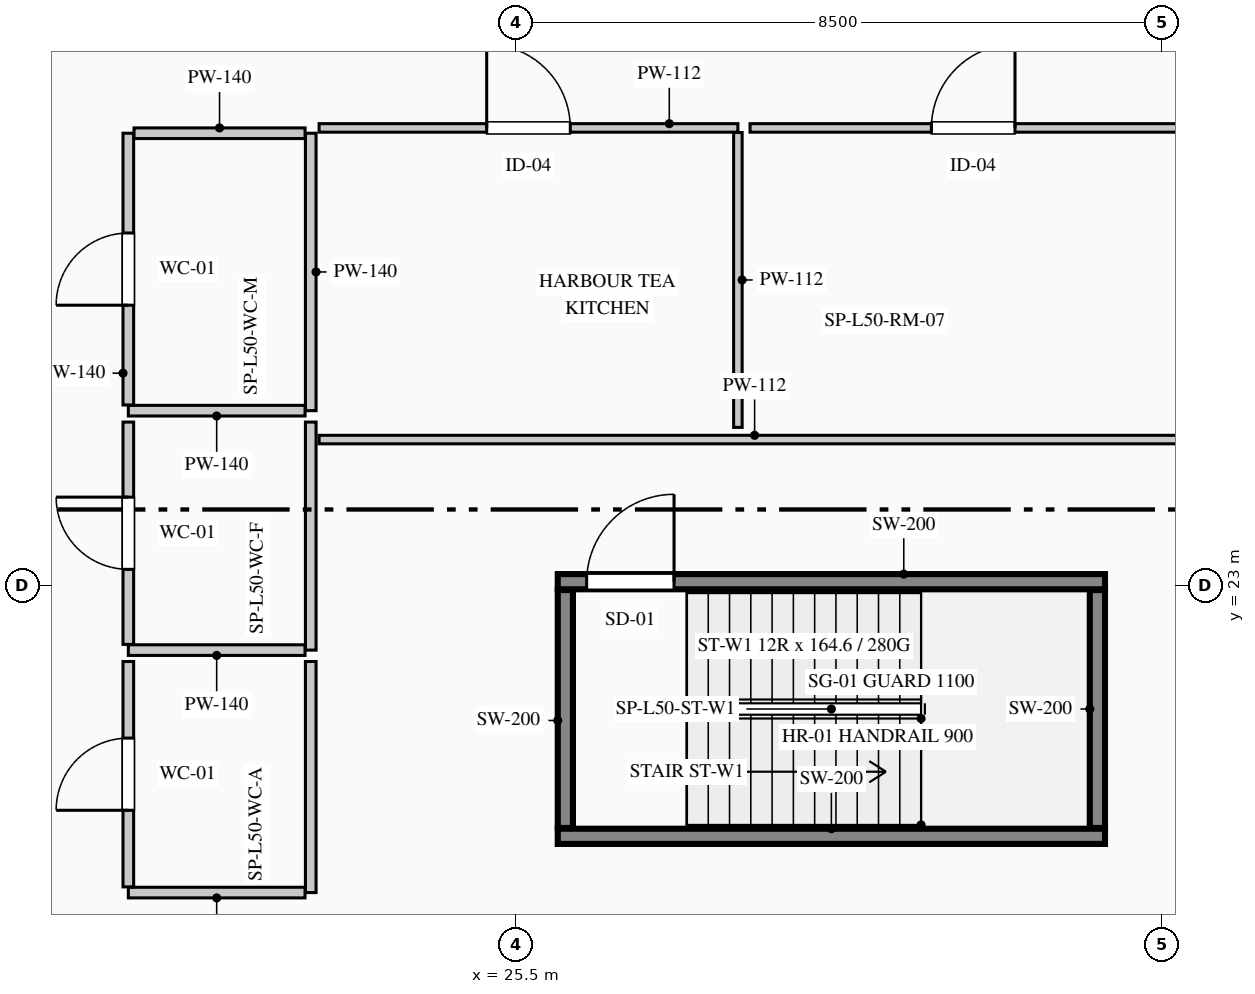
"""IFC4 building model, lengths in metres.
Left out: names, types, materials, properties, quantities, classifications, styles, units other than length and angle.
Written with IfcOpenShell. Run it as: python <this file> out.ifc"""

import sys

from ifc_helpers import new_model, si_unit, direction, frame, frame_2d, origin, place, context, subcontext, project, spatial, rectangle, extrude, element, fill, save


model = new_model("IFC4")
c1 = context("Model", 3, precision=1e-05, world=origin(), true_north=direction((0.0, 1.0)))
c2 = subcontext(c1, "Body", "Model", "MODEL_VIEW")
j1 = project(units=[si_unit("LENGTHUNIT", "METRE"), si_unit("PLANEANGLEUNIT", "RADIAN")], contexts=[c1])
p1 = place(None, origin())
s1 = spatial("IfcSite", under=j1, at=p1, CompositionType="ELEMENT")
p2 = place(p1, origin())
s2 = spatial("IfcBuilding", under=s1, at=p2, CompositionType="ELEMENT")
p3 = place(p2, frame((0.0, 0.0, 211.4)))
s3 = spatial("IfcBuildingStorey", under=s2, at=p3, CompositionType="ELEMENT", Elevation=211.4)
p4 = place(p3, frame((26.05, 19.7, 0.0), z_axis=(0.0, 0.0, 1.0), x_axis=(1.0, 0.0, 0.0)))
e1 = element("IfcWall", 1, at=p4, inside=s3, PredefinedType="SHEAR", context=c2, shape_type="SweptSolid", body=[
    extrude(rectangle(XDim=7.2, YDim=0.2, at=frame_2d((3.6, 0.0))), origin(), (0.0, 0.0, 1.0), 3.95),
])
p5 = place(p3, frame((26.05, 23.05, 0.0), z_axis=(0.0, 0.0, 1.0), x_axis=(1.0, 0.0, 0.0)))
e2 = element("IfcWall", 2, at=p5, inside=s3, PredefinedType="SHEAR", context=c2, shape_type="SweptSolid", body=[
    extrude(rectangle(XDim=7.2, YDim=0.2, at=frame_2d((3.6, 0.0))), origin(), (0.0, 0.0, 1.0), 3.95),
])
p6 = place(p5, frame((0.38, 0.0, 0.0)))
e3 = element("IfcOpeningElement", 3, at=p6, cuts=e2, PredefinedType="OPENING", context=c2, shape_type="SweptSolid", body=[
    extrude(rectangle(XDim=1.15, YDim=2.2, at=frame_2d((0.575, 1.1))), frame((0.0, 0.11, 0.0), z_axis=(0.0, -1.0, 0.0), x_axis=(1.0, 0.0, 0.0)), (0.0, 0.0, 1.0), 0.22),
])
for number, where, z_axis, x_axis in (
    (4, (26.15, 19.81, 0.0), (0.0, 0.0, 1.0), (0.0, 1.0, 0.0)),
    (5, (33.15, 19.81, 0.0), (0.0, 0.0, 1.0), (0.0, 1.0, 0.0)),
):
    element("IfcWall", number, at=place(p3, frame(where, z_axis=z_axis, x_axis=x_axis)), inside=s3, PredefinedType="SHEAR", context=c2, shape_type="SweptSolid", body=[
        extrude(rectangle(XDim=3.13, YDim=0.2, at=frame_2d((1.565, 0.0))), origin(), (0.0, 0.0, 1.0), 3.95),
    ])
p7 = place(p3, frame((22.8, 28.95, 0.0), z_axis=(0.0, 0.0, 1.0), x_axis=(0.0, -1.0, 0.0)))
e6 = element("IfcWall", 6, at=p7, inside=s3, PredefinedType="PARTITIONING", context=c2, shape_type="SweptSolid", body=[
    extrude(rectangle(XDim=3.65, YDim=0.14, at=frame_2d((1.825, 0.0))), origin(), (0.0, 0.0, 1.0), 3.325),
])
p8 = place(p3, frame((22.725, 25.3, 0.0), z_axis=(0.0, 0.0, 1.0), x_axis=(-1.0, 0.0, 0.0)))
e7 = element("IfcWall", 7, at=p8, inside=s3, PredefinedType="PARTITIONING", context=c2, shape_type="SweptSolid", body=[
    extrude(rectangle(XDim=2.325, YDim=0.14, at=frame_2d((1.163, 0.0))), origin(), (0.0, 0.0, 1.0), 3.7),
])
p9 = place(p3, frame((20.4, 25.375, 0.0), z_axis=(0.0, 0.0, 1.0), x_axis=(0.0, 1.0, 0.0)))
e8 = element("IfcWall", 8, at=p9, inside=s3, PredefinedType="PARTITIONING", context=c2, shape_type="SweptSolid", body=[
    extrude(rectangle(XDim=3.575, YDim=0.14, at=frame_2d((1.788, 0.0))), origin(), (0.0, 0.0, 1.0), 3.7),
])
p10 = place(p9, frame((1.312, 0.0, 0.0)))
e9 = element("IfcOpeningElement", 9, at=p10, cuts=e8, PredefinedType="OPENING", context=c2, shape_type="SweptSolid", body=[
    extrude(rectangle(XDim=0.95, YDim=2.15, at=frame_2d((0.475, 1.075))), frame((0.0, 0.08, 0.0), z_axis=(0.0, -1.0, 0.0), x_axis=(1.0, 0.0, 0.0)), (0.0, 0.0, 1.0), 0.16),
])
p11 = place(p3, frame((20.475, 28.95, 0.0), z_axis=(0.0, 0.0, 1.0), x_axis=(1.0, 0.0, 0.0)))
e10 = element("IfcWall", 10, at=p11, inside=s3, PredefinedType="PARTITIONING", context=c2, shape_type="SweptSolid", body=[
    extrude(rectangle(XDim=2.25, YDim=0.14, at=frame_2d((1.125, 0.0))), origin(), (0.0, 0.0, 1.0), 3.7),
])
p12 = place(p3, frame((22.8, 25.15, 0.0), z_axis=(0.0, 0.0, 1.0), x_axis=(0.0, -1.0, 0.0)))
e11 = element("IfcWall", 11, at=p12, inside=s3, PredefinedType="PARTITIONING", context=c2, shape_type="SweptSolid", body=[
    extrude(rectangle(XDim=3.0, YDim=0.14, at=frame_2d((1.5, 0.0))), origin(), (0.0, 0.0, 1.0), 3.325),
])
p13 = place(p3, frame((22.725, 22.15, 0.0), z_axis=(0.0, 0.0, 1.0), x_axis=(-1.0, 0.0, 0.0)))
e12 = element("IfcWall", 12, at=p13, inside=s3, PredefinedType="PARTITIONING", context=c2, shape_type="SweptSolid", body=[
    extrude(rectangle(XDim=2.325, YDim=0.14, at=frame_2d((1.163, 0.0))), origin(), (0.0, 0.0, 1.0), 3.7),
])
p14 = place(p3, frame((20.4, 22.225, 0.0), z_axis=(0.0, 0.0, 1.0), x_axis=(0.0, 1.0, 0.0)))
e13 = element("IfcWall", 13, at=p14, inside=s3, PredefinedType="PARTITIONING", context=c2, shape_type="SweptSolid", body=[
    extrude(rectangle(XDim=2.925, YDim=0.14, at=frame_2d((1.462, 0.0))), origin(), (0.0, 0.0, 1.0), 3.7),
])
p15 = place(p14, frame((0.988, 0.0, 0.0)))
e14 = element("IfcOpeningElement", 14, at=p15, cuts=e13, PredefinedType="OPENING", context=c2, shape_type="SweptSolid", body=[
    extrude(rectangle(XDim=0.95, YDim=2.15, at=frame_2d((0.475, 1.075))), frame((0.0, 0.08, 0.0), z_axis=(0.0, -1.0, 0.0), x_axis=(1.0, 0.0, 0.0)), (0.0, 0.0, 1.0), 0.16),
])
p16 = place(p3, frame((22.8, 22.0, 0.0), z_axis=(0.0, 0.0, 1.0), x_axis=(0.0, -1.0, 0.0)))
e15 = element("IfcWall", 15, at=p16, inside=s3, PredefinedType="PARTITIONING", context=c2, shape_type="SweptSolid", body=[
    extrude(rectangle(XDim=3.04, YDim=0.14, at=frame_2d((1.52, 0.0))), origin(), (0.0, 0.0, 1.0), 3.325),
])
p17 = place(p3, frame((22.725, 18.96, 0.0), z_axis=(0.0, 0.0, 1.0), x_axis=(-1.0, 0.0, 0.0)))
e16 = element("IfcWall", 16, at=p17, inside=s3, PredefinedType="PARTITIONING", context=c2, shape_type="SweptSolid", body=[
    extrude(rectangle(XDim=2.325, YDim=0.14, at=frame_2d((1.163, 0.0))), origin(), (0.0, 0.0, 1.0), 3.7),
])
p18 = place(p3, frame((20.4, 19.035, 0.0), z_axis=(0.0, 0.0, 1.0), x_axis=(0.0, 1.0, 0.0)))
e17 = element("IfcWall", 17, at=p18, inside=s3, PredefinedType="PARTITIONING", context=c2, shape_type="SweptSolid", body=[
    extrude(rectangle(XDim=2.965, YDim=0.14, at=frame_2d((1.482, 0.0))), origin(), (0.0, 0.0, 1.0), 3.7),
])
p19 = place(p18, frame((1.008, 0.0, 0.0)))
e18 = element("IfcOpeningElement", 18, at=p19, cuts=e17, PredefinedType="OPENING", context=c2, shape_type="SweptSolid", body=[
    extrude(rectangle(XDim=0.95, YDim=2.15, at=frame_2d((0.475, 1.075))), frame((0.0, 0.08, 0.0), z_axis=(0.0, -1.0, 0.0), x_axis=(1.0, 0.0, 0.0)), (0.0, 0.0, 1.0), 0.16),
])
p20 = place(p3, frame((22.91, 24.92, 0.0), z_axis=(0.0, 0.0, 1.0), x_axis=(1.0, 0.0, 0.0)))
e19 = element("IfcWall", 19, at=p20, inside=s3, PredefinedType="PARTITIONING", context=c2, shape_type="SweptSolid", body=[
    extrude(rectangle(XDim=11.46, YDim=0.112, at=frame_2d((5.73, 0.0))), origin(), (0.0, 0.0, 1.0), 3.325),
])
p21 = place(p3, frame((22.91, 29.02, 0.0), z_axis=(0.0, 0.0, 1.0), x_axis=(1.0, 0.0, 0.0)))
e20 = element("IfcWall", 20, at=p21, inside=s3, PredefinedType="PARTITIONING", context=c2, shape_type="SweptSolid", body=[
    extrude(rectangle(XDim=5.51, YDim=0.112, at=frame_2d((2.755, 0.0))), origin(), (0.0, 0.0, 1.0), 3.485),
])
p22 = place(p21, frame((2.205, 0.0, 0.0)))
e21 = element("IfcOpeningElement", 21, at=p22, cuts=e20, PredefinedType="OPENING", context=c2, shape_type="SweptSolid", body=[
    extrude(rectangle(XDim=1.1, YDim=2.2, at=frame_2d((0.55, 1.1))), frame((0.0, 0.066, 0.0), z_axis=(0.0, -1.0, 0.0), x_axis=(1.0, 0.0, 0.0)), (0.0, 0.0, 1.0), 0.132),
])
p23 = place(p3, frame((28.42, 28.959, 0.0), z_axis=(0.0, 0.0, 1.0), x_axis=(0.0, -1.0, 0.0)))
e22 = element("IfcWall", 22, at=p23, inside=s3, PredefinedType="PARTITIONING", context=c2, shape_type="SweptSolid", body=[
    extrude(rectangle(XDim=3.879, YDim=0.112, at=frame_2d((1.939, 0.0))), origin(), (0.0, 0.0, 1.0), 3.7),
])
p24 = place(p3, frame((28.58, 29.02, 0.0), z_axis=(0.0, 0.0, 1.0), x_axis=(1.0, 0.0, 0.0)))
e23 = element("IfcWall", 23, at=p24, inside=s3, PredefinedType="PARTITIONING", context=c2, shape_type="SweptSolid", body=[
    extrude(rectangle(XDim=5.872, YDim=0.112, at=frame_2d((2.936, 0.0))), origin(), (0.0, 0.0, 1.0), 3.485),
])
p25 = place(p24, frame((2.386, 0.0, 0.0)))
e24 = element("IfcOpeningElement", 24, at=p25, cuts=e23, PredefinedType="OPENING", context=c2, shape_type="SweptSolid", body=[
    extrude(rectangle(XDim=1.1, YDim=2.2, at=frame_2d((0.55, 1.1))), frame((0.0, 0.066, 0.0), z_axis=(0.0, -1.0, 0.0), x_axis=(1.0, 0.0, 0.0)), (0.0, 0.0, 1.0), 0.132),
])
p26 = place(p6, origin())
e25 = element("IfcDoor", 25, at=p26, inside=s3, OperationType="SINGLE_SWING_RIGHT", PredefinedType="DOOR", context=c2, shape_type="SweptSolid", body=[
    extrude(rectangle(XDim=1.15, YDim=2.2, at=frame_2d((0.575, 1.1))), frame((0.0, 0.025, 0.0), z_axis=(0.0, -1.0, 0.0), x_axis=(1.0, 0.0, 0.0)), (0.0, 0.0, 1.0), 0.05),
])
fill(e3, e25)
p27 = place(p10, origin())
e26 = element("IfcDoor", 26, at=p27, inside=s3, OperationType="SINGLE_SWING_LEFT", PredefinedType="DOOR", context=c2, shape_type="SweptSolid", body=[
    extrude(rectangle(XDim=0.95, YDim=2.15, at=frame_2d((0.475, 1.075))), frame((0.0, 0.025, 0.0), z_axis=(0.0, -1.0, 0.0), x_axis=(1.0, 0.0, 0.0)), (0.0, 0.0, 1.0), 0.05),
])
fill(e9, e26)
p28 = place(p15, origin())
e27 = element("IfcDoor", 27, at=p28, inside=s3, OperationType="SINGLE_SWING_RIGHT", PredefinedType="DOOR", context=c2, shape_type="SweptSolid", body=[
    extrude(rectangle(XDim=0.95, YDim=2.15, at=frame_2d((0.475, 1.075))), frame((0.0, 0.025, 0.0), z_axis=(0.0, -1.0, 0.0), x_axis=(1.0, 0.0, 0.0)), (0.0, 0.0, 1.0), 0.05),
])
fill(e14, e27)
p29 = place(p19, origin())
e28 = element("IfcDoor", 28, at=p29, inside=s3, OperationType="SINGLE_SWING_LEFT", PredefinedType="DOOR", context=c2, shape_type="SweptSolid", body=[
    extrude(rectangle(XDim=0.95, YDim=2.15, at=frame_2d((0.475, 1.075))), frame((0.0, 0.025, 0.0), z_axis=(0.0, -1.0, 0.0), x_axis=(1.0, 0.0, 0.0)), (0.0, 0.0, 1.0), 0.05),
])
fill(e18, e28)
p30 = place(p22, origin())
e29 = element("IfcDoor", 29, at=p30, inside=s3, OperationType="SINGLE_SWING_LEFT", PredefinedType="DOOR", context=c2, shape_type="SweptSolid", body=[
    extrude(rectangle(XDim=1.1, YDim=2.2, at=frame_2d((0.55, 1.1))), frame((0.0, 0.025, 0.0), z_axis=(0.0, -1.0, 0.0), x_axis=(1.0, 0.0, 0.0)), (0.0, 0.0, 1.0), 0.05),
])
fill(e21, e29)
p31 = place(p25, origin())
e30 = element("IfcDoor", 30, at=p31, inside=s3, OperationType="SINGLE_SWING_RIGHT", PredefinedType="DOOR", context=c2, shape_type="SweptSolid", body=[
    extrude(rectangle(XDim=1.1, YDim=2.2, at=frame_2d((0.55, 1.1))), frame((0.0, 0.025, 0.0), z_axis=(0.0, -1.0, 0.0), x_axis=(1.0, 0.0, 0.0)), (0.0, 0.0, 1.0), 0.05),
])
fill(e24, e30)
save(model, sys.argv[1])
